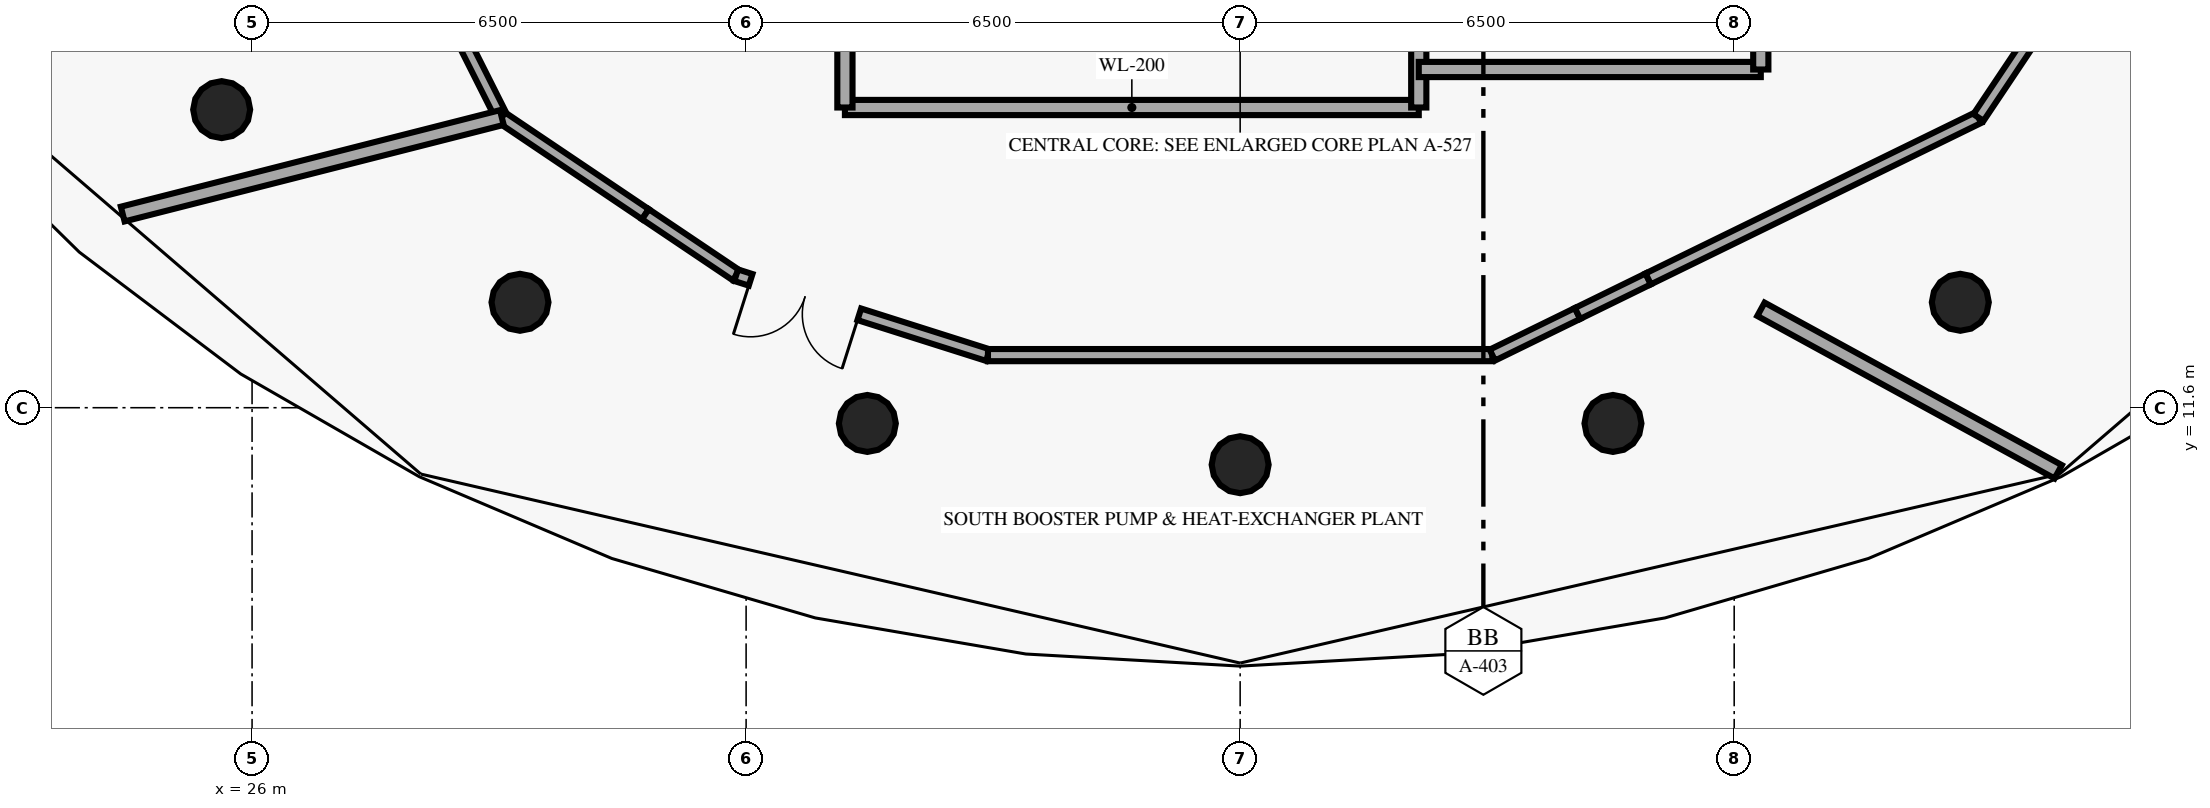
"""IFC4 building model, lengths in metres.
Left out: names, types, materials, properties, quantities, classifications, styles, units other than length and angle.
Written with IfcOpenShell. Run it as: python <this file> out.ifc"""

import sys

from ifc_helpers import new_model, si_unit, direction, frame, frame_2d, origin, origin_2d, place, context, subcontext, project, spatial, rectangle, circle, extrude, element, fill, save


model = new_model("IFC4")
c1 = context("Model", 3, precision=1e-05, world=origin(), true_north=direction((0.0, 1.0)))
c2 = subcontext(c1, "Body", "Model", "MODEL_VIEW")
j1 = project(units=[si_unit("LENGTHUNIT", "METRE"), si_unit("PLANEANGLEUNIT", "RADIAN")], contexts=[c1])
p1 = place(None, origin())
s1 = spatial("IfcSite", under=j1, at=p1, CompositionType="ELEMENT")
p2 = place(p1, origin())
s2 = spatial("IfcBuilding", under=s1, at=p2, CompositionType="ELEMENT")
p3 = place(p2, frame((0.0, 0.0, 301.2)))
s3 = spatial("IfcBuildingStorey", under=s2, at=p3, CompositionType="ELEMENT", Elevation=301.2)
for number, where, z_axis, x_axis in (
    (1, (25.6, 15.522, 0.0), (0.0, 0.0, 1.0), (1.0, 0.0, 0.0)),
    (2, (29.525, 12.987, 0.0), (0.0, 0.0, 1.0), (1.0, 0.0, 0.0)),
    (3, (34.095, 11.393, 0.0), (0.0, 0.0, 1.0), (1.0, 0.0, 0.0)),
    (4, (39.0, 10.85, 0.0), (0.0, 0.0, 1.0), (1.0, 0.0, 0.0)),
    (5, (43.905, 11.393, 0.0), (0.0, 0.0, 1.0), (1.0, 0.0, 0.0)),
    (6, (48.475, 12.987, 0.0), (0.0, 0.0, 1.0), (1.0, 0.0, 0.0)),
):
    element("IfcColumn", number, at=place(p3, frame(where, z_axis=z_axis, x_axis=x_axis)), inside=s3, PredefinedType="COLUMN", context=c2, shape_type="SweptSolid", body=[
        extrude(circle(Radius=0.375, at=origin_2d()), origin(), (0.0, 0.0, 1.0), 5.25),
    ])
p4 = place(p3, frame((33.8, 15.55, 0.0), z_axis=(0.0, 0.0, 1.0), x_axis=(1.0, 0.0, 0.0)))
e7 = element("IfcWall", 7, at=p4, inside=s3, PredefinedType="SOLIDWALL", context=c2, shape_type="SweptSolid", body=[
    extrude(rectangle(XDim=7.55, YDim=0.2, at=frame_2d((3.775, 0.0))), origin(), (0.0, 0.0, 1.0), 5.25),
])
p5 = place(p3, frame((33.8, 15.55, 0.0), z_axis=(0.0, 0.0, 1.0), x_axis=(0.0, 1.0, 0.0)))
e8 = element("IfcWall", 8, at=p5, inside=s3, PredefinedType="SOLIDWALL", context=c2, shape_type="SweptSolid", body=[
    extrude(rectangle(XDim=2.8, YDim=0.2, at=frame_2d((1.4, 0.0))), origin(), (0.0, 0.0, 1.0), 5.25),
])
p6 = place(p3, frame((41.35, 15.55, 0.0), z_axis=(0.0, 0.0, 1.0), x_axis=(0.0, 1.0, 0.0)))
e9 = element("IfcWall", 9, at=p6, inside=s3, PredefinedType="SOLIDWALL", context=c2, shape_type="SweptSolid", body=[
    extrude(rectangle(XDim=2.8, YDim=0.2, at=frame_2d((1.4, 0.0))), origin(), (0.0, 0.0, 1.0), 5.25),
])
p7 = place(p6, frame((0.9, 0.0, 0.0)))
e10 = element("IfcOpeningElement", 10, at=p7, cuts=e9, PredefinedType="OPENING", context=c2, shape_type="SweptSolid", body=[
    extrude(rectangle(XDim=1.1, YDim=2.15, at=frame_2d((0.55, 1.075))), frame((0.0, 0.11, 0.0), z_axis=(0.0, -1.0, 0.0), x_axis=(1.0, 0.0, 0.0)), (0.0, 0.0, 1.0), 0.22),
])
p8 = place(p3, frame((41.35, 16.05, 0.0), z_axis=(0.0, 0.0, 1.0), x_axis=(1.0, 0.0, 0.0)))
e11 = element("IfcWall", 11, at=p8, inside=s3, PredefinedType="SOLIDWALL", context=c2, shape_type="SweptSolid", body=[
    extrude(rectangle(XDim=4.5, YDim=0.2, at=frame_2d((2.25, 0.0))), origin(), (0.0, 0.0, 1.0), 5.25),
])
p9 = place(p3, frame((45.85, 16.05, 0.0), z_axis=(0.0, 0.0, 1.0), x_axis=(0.0, 1.0, 0.0)))
e12 = element("IfcWall", 12, at=p9, inside=s3, PredefinedType="SOLIDWALL", context=c2, shape_type="SweptSolid", body=[
    extrude(rectangle(XDim=2.3, YDim=0.2, at=frame_2d((1.15, 0.0))), origin(), (0.0, 0.0, 1.0), 5.25),
])
p10 = place(p3, frame((25.663, 22.614, 0.0), z_axis=(0.0, 0.0, 1.0), x_axis=(0.449672541353, -0.893193487187, 0.0)))
e13 = element("IfcWall", 13, at=p10, inside=s3, PredefinedType="PARTITIONING", context=c2, shape_type="SweptSolid", body=[
    extrude(rectangle(XDim=8.057, YDim=0.16, at=frame_2d((4.028, 0.0))), origin(), (0.0, 0.0, 1.0), 5.25),
])
p11 = place(p3, frame((29.286, 15.418, 0.0), z_axis=(0.0, 0.0, 1.0), x_axis=(0.829501793483, -0.558504050665, 0.0)))
e14 = element("IfcWall", 14, at=p11, inside=s3, PredefinedType="PARTITIONING", context=c2, shape_type="SweptSolid", body=[
    extrude(rectangle(XDim=2.277, YDim=0.16, at=frame_2d((1.139, 0.0))), origin(), (0.0, 0.0, 1.0), 5.25),
])
p12 = place(p3, frame((31.175, 14.146, 0.0), z_axis=(0.0, 0.0, 1.0), x_axis=(0.829772117197, -0.558102350401, 0.0)))
e15 = element("IfcWall", 15, at=p12, inside=s3, PredefinedType="PARTITIONING", context=c2, shape_type="SweptSolid", body=[
    extrude(rectangle(XDim=1.439, YDim=0.16, at=frame_2d((0.719, 0.0))), origin(), (0.0, 0.0, 1.0), 3.8),
])
p13 = place(p3, frame((35.682, 12.292, 0.0), z_axis=(0.0, 0.0, 1.0), x_axis=(-0.953183734956, 0.302391744951, 0.0)))
e16 = element("IfcWall", 16, at=p13, inside=s3, PredefinedType="PARTITIONING", context=c2, shape_type="SweptSolid", body=[
    extrude(rectangle(XDim=3.476, YDim=0.16, at=frame_2d((1.738, 0.0))), origin(), (0.0, 0.0, 1.0), 3.8),
])
p14 = place(p13, frame((1.776, 0.0, 0.0)))
e17 = element("IfcOpeningElement", 17, at=p14, cuts=e16, PredefinedType="OPENING", context=c2, shape_type="SweptSolid", body=[
    extrude(rectangle(XDim=1.5, YDim=2.2, at=frame_2d((0.75, 1.1))), frame((0.0, 0.09, 0.0), z_axis=(0.0, -1.0, 0.0), x_axis=(1.0, 0.0, 0.0)), (0.0, 0.0, 1.0), 0.18),
])
p15 = place(p3, frame((35.682, 12.292, 0.0), z_axis=(0.0, 0.0, 1.0), x_axis=(1.0, 0.0, 0.0)))
e18 = element("IfcWall", 18, at=p15, inside=s3, PredefinedType="PARTITIONING", context=c2, shape_type="SweptSolid", body=[
    extrude(rectangle(XDim=6.636, YDim=0.16, at=frame_2d((3.318, 0.0))), origin(), (0.0, 0.0, 1.0), 3.8),
])
p16 = place(p3, frame((42.318, 12.292, 0.0), z_axis=(0.0, 0.0, 1.0), x_axis=(0.898344894696, 0.439290849181, 0.0)))
e19 = element("IfcWall", 19, at=p16, inside=s3, PredefinedType="PARTITIONING", context=c2, shape_type="SweptSolid", body=[
    extrude(rectangle(XDim=1.248, YDim=0.16, at=frame_2d((0.624, 0.0))), origin(), (0.0, 0.0, 1.0), 5.25),
])
p17 = place(p3, frame((43.439, 12.84, 0.0), z_axis=(0.0, 0.0, 1.0), x_axis=(0.898307833807, 0.439366630187, 0.0)))
e20 = element("IfcWall", 20, at=p17, inside=s3, PredefinedType="PARTITIONING", context=c2, shape_type="SweptSolid", body=[
    extrude(rectangle(XDim=1.035, YDim=0.16, at=frame_2d((0.518, 0.0))), origin(), (0.0, 0.0, 1.0), 3.8),
])
p18 = place(p3, frame((44.369, 13.295, 0.0), z_axis=(0.0, 0.0, 1.0), x_axis=(0.898488801633, 0.43899643887, 0.0)))
e21 = element("IfcWall", 21, at=p18, inside=s3, PredefinedType="PARTITIONING", context=c2, shape_type="SweptSolid", body=[
    extrude(rectangle(XDim=4.836, YDim=0.16, at=frame_2d((2.418, 0.0))), origin(), (0.0, 0.0, 1.0), 5.25),
])
p19 = place(p3, frame((48.714, 15.418, 0.0), z_axis=(0.0, 0.0, 1.0), x_axis=(0.556056751682, 0.831144324958, 0.0)))
e22 = element("IfcWall", 22, at=p19, inside=s3, PredefinedType="PARTITIONING", context=c2, shape_type="SweptSolid", body=[
    extrude(rectangle(XDim=3.985, YDim=0.16, at=frame_2d((1.992, 0.0))), origin(), (0.0, 0.0, 1.0), 5.25),
])
p20 = place(p3, frame((29.286, 15.418, 0.0), z_axis=(0.0, 0.0, 1.0), x_axis=(-0.969078615775, -0.246752176175, 0.0)))
e23 = element("IfcWall", 23, at=p20, inside=s3, PredefinedType="SOLIDWALL", context=c2, shape_type="SweptSolid", body=[
    extrude(rectangle(XDim=5.147, YDim=0.2, at=frame_2d((2.573, 0.0))), origin(), (0.0, 0.0, 1.0), 5.25),
])
p21 = place(p3, frame((45.852, 12.895, 0.0), z_axis=(0.0, 0.0, 1.0), x_axis=(0.877449312493, -0.479669369468, 0.0)))
e24 = element("IfcWall", 24, at=p21, inside=s3, PredefinedType="SOLIDWALL", context=c2, shape_type="SweptSolid", body=[
    extrude(rectangle(XDim=4.457, YDim=0.2, at=frame_2d((2.229, 0.0))), origin(), (0.0, 0.0, 1.0), 5.25),
])
p22 = place(p14, origin())
e25 = element("IfcDoor", 25, at=p22, inside=s3, OperationType="DOUBLE_DOOR_SINGLE_SWING", PredefinedType="DOOR", context=c2, shape_type="SweptSolid", body=[
    extrude(rectangle(XDim=1.5, YDim=2.2, at=frame_2d((0.75, 1.1))), frame((0.0, 0.025, 0.0), z_axis=(0.0, -1.0, 0.0), x_axis=(1.0, 0.0, 0.0)), (0.0, 0.0, 1.0), 0.05),
])
fill(e17, e25)
save(model, sys.argv[1])
